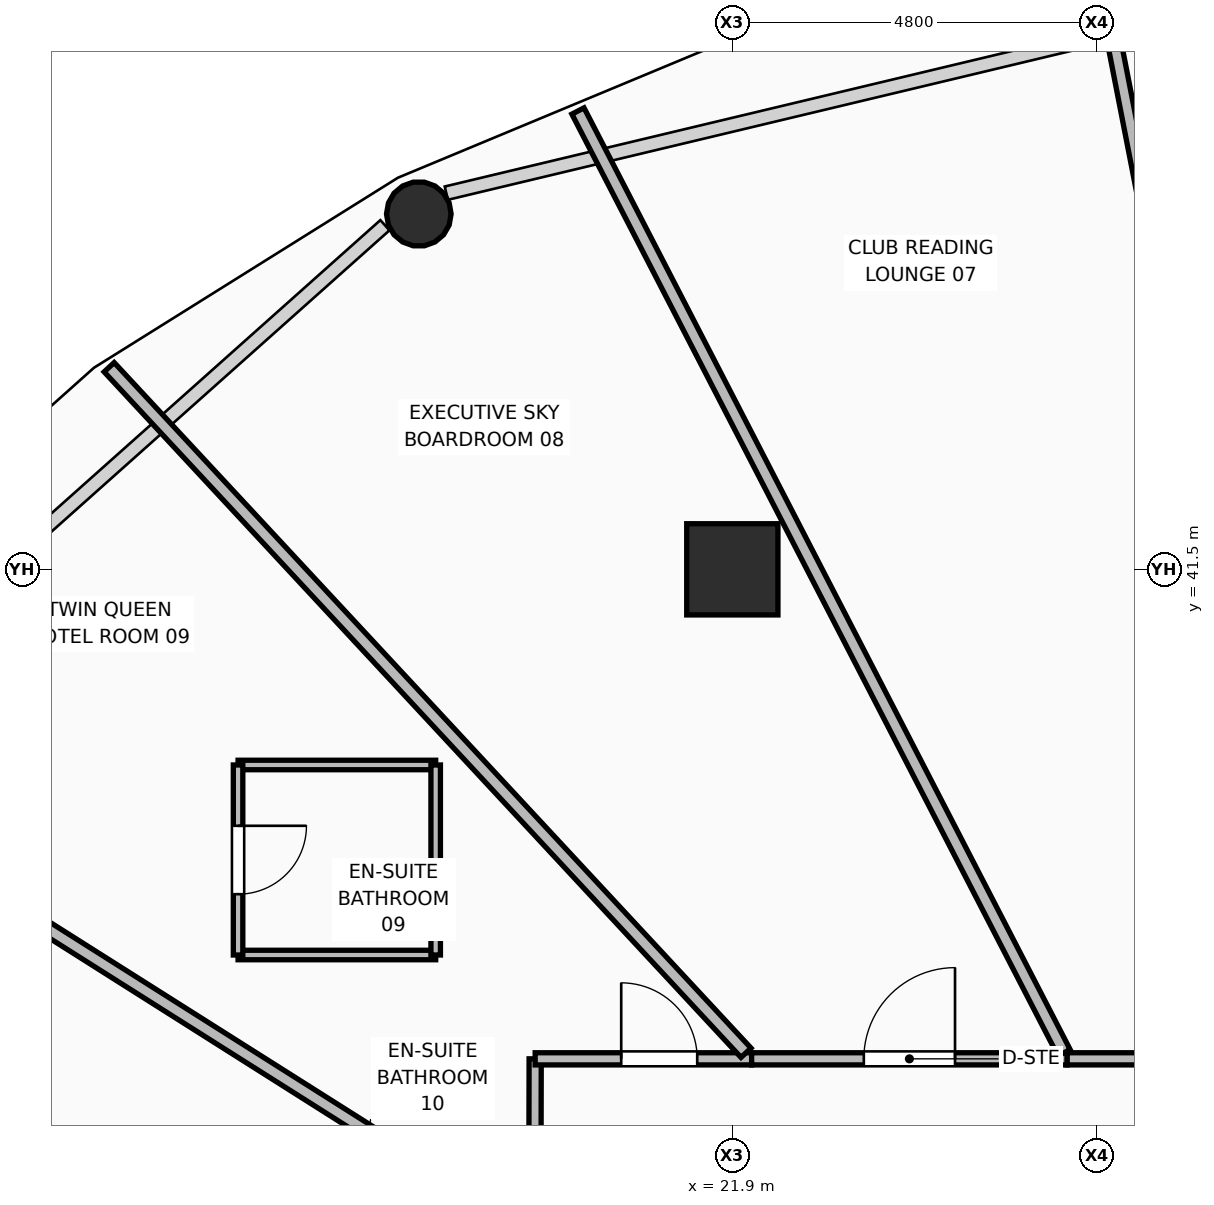
"""IFC4 building model, lengths in metres.
Left out: names, types, materials, properties, quantities, classifications, styles, units other than length and angle.
Written with IfcOpenShell. Run it as: python <this file> out.ifc"""

import sys

from ifc_helpers import new_model, si_unit, direction, frame, frame_2d, origin, origin_2d, place, context, subcontext, project, spatial, rectangle, hollow_rectangle, hollow_circle, extrude, element, fill, save


model = new_model("IFC4")
c1 = context("Model", 3, precision=1e-05, world=origin(), true_north=direction((0.0, 1.0)))
c2 = subcontext(c1, "Body", "Model", "MODEL_VIEW")
j1 = project(units=[si_unit("LENGTHUNIT", "METRE"), si_unit("PLANEANGLEUNIT", "RADIAN")], contexts=[c1])
p1 = place(None, origin())
s1 = spatial("IfcSite", under=j1, at=p1, CompositionType="ELEMENT")
p2 = place(p1, origin())
s2 = spatial("IfcBuilding", under=s1, at=p2, CompositionType="ELEMENT")
p3 = place(p2, frame((0.0, 0.0, 64.5)))
s3 = spatial("IfcBuildingStorey", under=s2, at=p3, CompositionType="ELEMENT", Elevation=64.5)
p4 = place(p3, frame((21.9, 41.5, 0.0), z_axis=(0.0, 0.0, 1.0), x_axis=(1.0, 0.0, 0.0)))
e1 = element("IfcColumn", 1, at=p4, inside=s3, PredefinedType="COLUMN", context=c2, shape_type="SweptSolid", body=[
    extrude(hollow_rectangle(XDim=1.2, YDim=1.2, WallThickness=0.045, at=origin_2d()), origin(), (0.0, 0.0, 1.0), 3.75),
])
p5 = place(p3, frame((17.775, 46.175, 0.0), z_axis=(-0.027932729625, 0.043094260131, 0.998680453078), x_axis=(-0.839141746313, -0.543912795946, 0.0)))
e2 = element("IfcColumn", 2, at=p5, inside=s3, PredefinedType="COLUMN", context=c2, shape_type="SweptSolid", body=[
    extrude(hollow_circle(Radius=0.425, WallThickness=0.04, at=origin_2d()), origin(), (0.0, 0.0, 1.0), 3.575),
])
p6 = place(p3, frame((19.301, 32.715, 0.0), z_axis=(0.0, 0.0, 1.0), x_axis=(0.002082244315, 0.999997832127, 0.0)))
e3 = element("IfcWall", 3, at=p6, inside=s3, PredefinedType="PARTITIONING", context=c2, shape_type="SweptSolid", body=[
    extrude(rectangle(XDim=2.345, YDim=0.16, at=frame_2d((1.172, 0.0))), origin(), (0.0, 0.0, 1.0), 2.928),
])
p7 = place(p3, frame((19.306, 35.06, 0.0), z_axis=(0.0, 0.0, 1.0), x_axis=(1.0, 0.0, 0.0)))
e4 = element("IfcWall", 4, at=p7, inside=s3, PredefinedType="PARTITIONING", context=c2, shape_type="SweptSolid", body=[
    extrude(rectangle(XDim=2.848, YDim=0.16, at=frame_2d((1.424, 0.0))), origin(), (0.0, 0.0, 1.0), 2.928),
])
p8 = place(p7, frame((1.132, 0.0, 0.0)))
e5 = element("IfcOpeningElement", 5, at=p8, cuts=e4, PredefinedType="OPENING", context=c2, shape_type="SweptSolid", body=[
    extrude(rectangle(XDim=1.0, YDim=2.1, at=frame_2d((0.5, 1.05))), frame((0.0, 0.09, 0.0), z_axis=(0.0, -1.0, 0.0), x_axis=(1.0, 0.0, 0.0)), (0.0, 0.0, 1.0), 0.18),
])
p9 = place(p3, frame((22.154, 35.06, 0.0), z_axis=(0.0, 0.0, 1.0), x_axis=(1.0, 0.0, 0.0)))
e6 = element("IfcWall", 6, at=p9, inside=s3, PredefinedType="PARTITIONING", context=c2, shape_type="SweptSolid", body=[
    extrude(rectangle(XDim=4.152, YDim=0.16, at=frame_2d((2.076, 0.0))), origin(), (0.0, 0.0, 1.0), 3.55),
])
p10 = place(p9, frame((1.476, 0.0, 0.0)))
e7 = element("IfcOpeningElement", 7, at=p10, cuts=e6, PredefinedType="OPENING", context=c2, shape_type="SweptSolid", body=[
    extrude(rectangle(XDim=1.2, YDim=2.1, at=frame_2d((0.6, 1.05))), frame((0.0, 0.09, 0.0), z_axis=(0.0, -1.0, 0.0), x_axis=(1.0, 0.0, 0.0)), (0.0, 0.0, 1.0), 0.18),
])
p11 = place(p3, frame((26.306, 35.06, 0.0), z_axis=(0.0, 0.0, 1.0), x_axis=(1.0, 0.0, 0.0)))
e8 = element("IfcWall", 8, at=p11, inside=s3, PredefinedType="PARTITIONING", context=c2, shape_type="SweptSolid", body=[
    extrude(rectangle(XDim=3.23, YDim=0.16, at=frame_2d((1.615, 0.0))), origin(), (0.0, 0.0, 1.0), 3.55),
])
p12 = place(p11, frame((1.015, 0.0, 0.0)))
e9 = element("IfcOpeningElement", 9, at=p12, cuts=e8, PredefinedType="OPENING", context=c2, shape_type="SweptSolid", body=[
    extrude(rectangle(XDim=1.2, YDim=2.1, at=frame_2d((0.6, 1.05))), frame((0.0, 0.09, 0.0), z_axis=(0.0, -1.0, 0.0), x_axis=(1.0, 0.0, 0.0)), (0.0, 0.0, 1.0), 0.18),
])
p13 = place(p3, frame((29.521, 35.14, 0.0), z_axis=(0.0, 0.0, 1.0), x_axis=(-0.19163010074, 0.981467220283, 0.0)))
e10 = element("IfcWall", 10, at=p13, inside=s3, PredefinedType="PARTITIONING", context=c2, shape_type="SweptSolid", body=[
    extrude(rectangle(XDim=14.659, YDim=0.18, at=frame_2d((7.33, 0.0))), origin(), (0.0, 0.0, 1.0), 2.775),
])
p14 = place(p3, frame((26.265, 35.14, 0.0), z_axis=(0.0, 0.0, 1.0), x_axis=(-0.458704466824, 0.888588888134, 0.0)))
e11 = element("IfcWall", 11, at=p14, inside=s3, PredefinedType="PARTITIONING", context=c2, shape_type="SweptSolid", body=[
    extrude(rectangle(XDim=13.944, YDim=0.18, at=frame_2d((6.972, 0.0))), origin(), (0.0, 0.0, 1.0), 2.775),
])
p15 = place(p3, frame((22.08, 35.14, 0.0), z_axis=(0.0, 0.0, 1.0), x_axis=(-0.680639721347, 0.732618297427, 0.0)))
e12 = element("IfcWall", 12, at=p15, inside=s3, PredefinedType="PARTITIONING", context=c2, shape_type="SweptSolid", body=[
    extrude(rectangle(XDim=12.311, YDim=0.18, at=frame_2d((6.155, 0.0))), origin(), (0.0, 0.0, 1.0), 2.775),
])
p16 = place(p3, frame((19.21, 32.773, 0.0), z_axis=(0.0, 0.0, 1.0), x_axis=(-0.845148426003, 0.534531699738, 0.0)))
e13 = element("IfcWall", 13, at=p16, inside=s3, PredefinedType="PARTITIONING", context=c2, shape_type="SweptSolid", body=[
    extrude(rectangle(XDim=12.291, YDim=0.18, at=frame_2d((6.146, 0.0))), origin(), (0.0, 0.0, 1.0), 2.775),
])
for number, where, z_axis, x_axis in (
    (14, (15.397, 36.426, 0.0), (0.0, 0.0, 1.0), (1.0, 0.0, 0.0)),
    (15, (15.397, 38.926, 0.0), (0.0, 0.0, 1.0), (1.0, 0.0, 0.0)),
):
    element("IfcWall", number, at=place(p3, frame(where, z_axis=z_axis, x_axis=x_axis)), inside=s3, PredefinedType="PARTITIONING", context=c2, shape_type="SweptSolid", body=[
        extrude(rectangle(XDim=2.6, YDim=0.125, at=frame_2d((1.3, 0.0))), origin(), (0.0, 0.0, 1.0), 3.55),
    ])
p17 = place(p3, frame((15.397, 36.426, 0.0), z_axis=(0.0, 0.0, 1.0), x_axis=(0.0, 1.0, 0.0)))
e16 = element("IfcWall", 16, at=p17, inside=s3, PredefinedType="PARTITIONING", context=c2, shape_type="SweptSolid", body=[
    extrude(rectangle(XDim=2.5, YDim=0.125, at=frame_2d((1.25, 0.0))), origin(), (0.0, 0.0, 1.0), 3.55),
])
p18 = place(p17, frame((0.8, 0.0, 0.0)))
e17 = element("IfcOpeningElement", 17, at=p18, cuts=e16, PredefinedType="OPENING", context=c2, shape_type="SweptSolid", body=[
    extrude(rectangle(XDim=0.9, YDim=2.1, at=frame_2d((0.45, 1.05))), frame((0.0, 0.073, 0.0), z_axis=(0.0, -1.0, 0.0), x_axis=(1.0, 0.0, 0.0)), (0.0, 0.0, 1.0), 0.145),
])
p19 = place(p3, frame((17.997, 36.426, 0.0), z_axis=(0.0, 0.0, 1.0), x_axis=(0.0, 1.0, 0.0)))
e18 = element("IfcWall", 18, at=p19, inside=s3, PredefinedType="PARTITIONING", context=c2, shape_type="SweptSolid", body=[
    extrude(rectangle(XDim=2.5, YDim=0.125, at=frame_2d((1.25, 0.0))), origin(), (0.0, 0.0, 1.0), 3.55),
])
p20 = place(p10, origin())
e19 = element("IfcDoor", 19, at=p20, inside=s3, OperationType="SINGLE_SWING_RIGHT", PredefinedType="DOOR", context=c2, shape_type="SweptSolid", body=[
    extrude(rectangle(XDim=1.2, YDim=2.1, at=frame_2d((0.6, 1.05))), frame((0.0, 0.025, 0.0), z_axis=(0.0, -1.0, 0.0), x_axis=(1.0, 0.0, 0.0)), (0.0, 0.0, 1.0), 0.05),
])
fill(e7, e19)
p21 = place(p18, frame((0.9, 0.0, 0.0), z_axis=(0.0, 0.0, 1.0), x_axis=(-1.0, 0.0, 0.0)))
e20 = element("IfcDoor", 20, at=p21, inside=s3, OperationType="SINGLE_SWING_LEFT", PredefinedType="DOOR", context=c2, shape_type="SweptSolid", body=[
    extrude(rectangle(XDim=0.9, YDim=2.1, at=frame_2d((0.45, 1.05))), frame((0.0, 0.025, 0.0), z_axis=(0.0, -1.0, 0.0), x_axis=(1.0, 0.0, 0.0)), (0.0, 0.0, 1.0), 0.05),
])
fill(e17, e20)
p22 = place(p8, origin())
e21 = element("IfcDoor", 21, at=p22, inside=s3, OperationType="SINGLE_SWING_LEFT", PredefinedType="DOOR", context=c2, shape_type="SweptSolid", body=[
    extrude(rectangle(XDim=1.0, YDim=2.1, at=frame_2d((0.5, 1.05))), frame((0.0, 0.025, 0.0), z_axis=(0.0, -1.0, 0.0), x_axis=(1.0, 0.0, 0.0)), (0.0, 0.0, 1.0), 0.05),
])
fill(e5, e21)
save(model, sys.argv[1])
